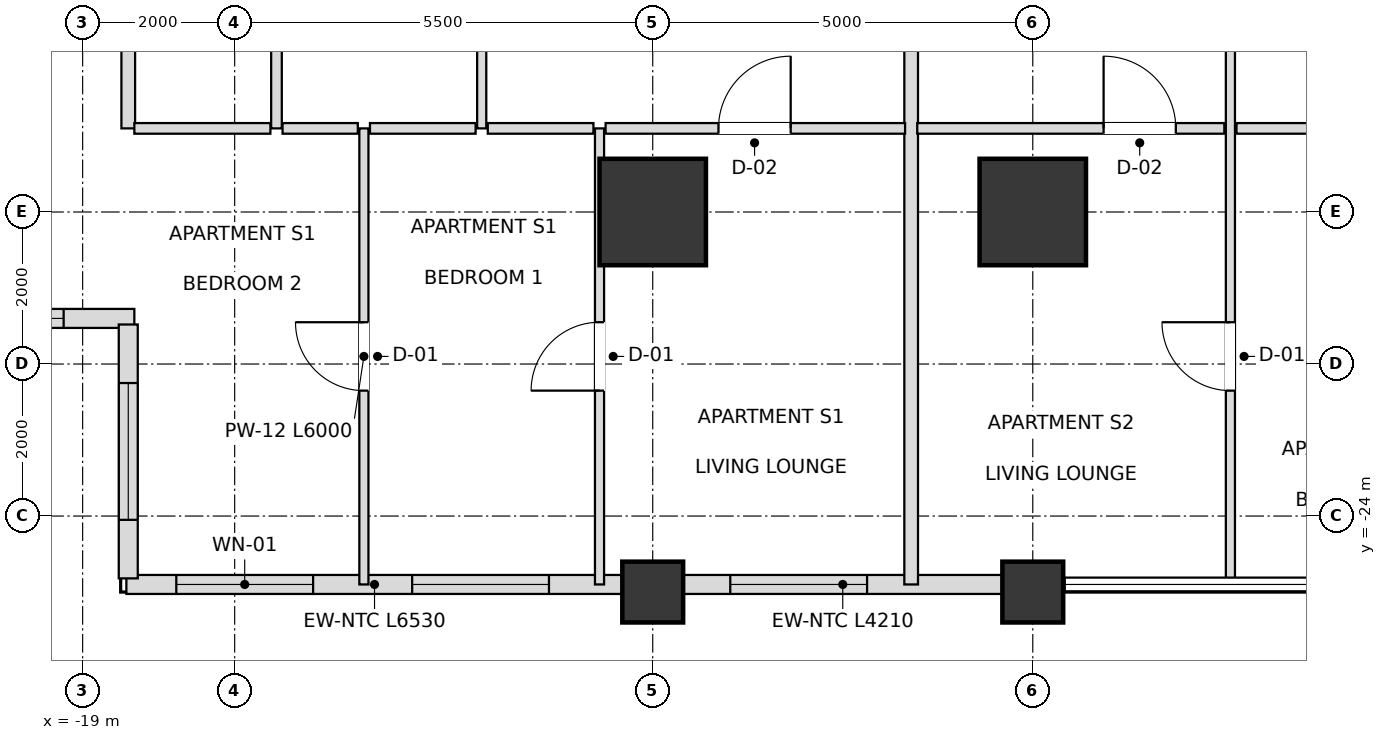
"""IFC4 building model, lengths in metres.
Left out: names, types, materials, properties, quantities, classifications, styles, units other than length and angle.
Written with IfcOpenShell. Run it as: python <this file> out.ifc"""

import sys

from ifc_helpers import new_model, si_unit, direction, frame, frame_2d, origin, origin_2d, place, context, subcontext, project, spatial, rectangle, extrude, element, fill, save


model = new_model("IFC4")
c1 = context("Model", 3, precision=1e-05, world=origin(), true_north=direction((0.0, 1.0)))
c2 = subcontext(c1, "Body", "Model", "MODEL_VIEW")
j1 = project(units=[si_unit("LENGTHUNIT", "METRE"), si_unit("PLANEANGLEUNIT", "RADIAN")], contexts=[c1])
p1 = place(None, origin())
s1 = spatial("IfcSite", under=j1, at=p1, CompositionType="ELEMENT")
p2 = place(p1, origin())
s2 = spatial("IfcBuilding", under=s1, at=p2, CompositionType="ELEMENT")
p3 = place(p2, frame((0.0, 0.0, 32.4)))
s3 = spatial("IfcBuildingStorey", under=s2, at=p3, CompositionType="ELEMENT", Elevation=32.4)
for number, where, z_axis, x_axis in (
    (1, (-11.5, -20.0, 0.0), (0.0, 0.0, 1.0), (1.0, 0.0, 0.0)),
    (2, (-6.5, -20.0, 0.0), (0.0, 0.0, 1.0), (1.0, 0.0, 0.0)),
):
    element("IfcColumn", number, at=place(p3, frame(where, z_axis=z_axis, x_axis=x_axis)), inside=s3, PredefinedType="USERDEFINED", context=c2, shape_type="SweptSolid", body=[
        extrude(rectangle(XDim=1.4, YDim=1.4, at=origin_2d()), origin(), (0.0, 0.0, 1.0), 3.6),
    ])
for number, where, z_axis, x_axis in (
    (3, (-11.5, -25.0, 0.0), (0.0, 0.0, 1.0), (1.0, 0.0, 0.0)),
    (4, (-6.5, -25.0, 0.0), (0.0, 0.0, 1.0), (1.0, 0.0, 0.0)),
):
    element("IfcColumn", number, at=place(p3, frame(where, z_axis=z_axis, x_axis=x_axis)), inside=s3, PredefinedType="COLUMN", context=c2, shape_type="SweptSolid", body=[
        extrude(rectangle(XDim=0.8, YDim=0.8, at=origin_2d()), origin(), (0.0, 0.0, 1.0), 3.6),
    ])
p4 = place(p3, frame((-18.425, -24.9, 0.0), z_axis=(0.0, 0.0, 1.0), x_axis=(1.0, 0.0, 0.0)))
e5 = element("IfcWall", 5, at=p4, inside=s3, PredefinedType="SOLIDWALL", context=c2, shape_type="SweptSolid", body=[
    extrude(rectangle(XDim=6.53, YDim=0.25, at=frame_2d((3.265, 0.0))), origin(), (0.0, 0.0, 1.0), 2.736),
])
p5 = place(p4, frame((0.657, 0.0, 0.72)))
e6 = element("IfcOpeningElement", 6, at=p5, cuts=e5, PredefinedType="OPENING", context=c2, shape_type="SweptSolid", body=[
    extrude(rectangle(XDim=1.8, YDim=1.68, at=frame_2d((0.9, 0.84))), frame((0.0, 0.135, 0.0), z_axis=(0.0, -1.0, 0.0), x_axis=(1.0, 0.0, 0.0)), (0.0, 0.0, 1.0), 0.27),
])
p6 = place(p4, frame((3.76, 0.0, 0.72)))
e7 = element("IfcOpeningElement", 7, at=p6, cuts=e5, PredefinedType="OPENING", context=c2, shape_type="SweptSolid", body=[
    extrude(rectangle(XDim=1.8, YDim=1.68, at=frame_2d((0.9, 0.84))), frame((0.0, 0.135, 0.0), z_axis=(0.0, -1.0, 0.0), x_axis=(1.0, 0.0, 0.0)), (0.0, 0.0, 1.0), 0.27),
])
p7 = place(p3, frame((-11.105, -24.9, 0.0), z_axis=(0.0, 0.0, 1.0), x_axis=(1.0, 0.0, 0.0)))
e8 = element("IfcWall", 8, at=p7, inside=s3, PredefinedType="SOLIDWALL", context=c2, shape_type="SweptSolid", body=[
    extrude(rectangle(XDim=4.21, YDim=0.25, at=frame_2d((2.105, 0.0))), origin(), (0.0, 0.0, 1.0), 2.736),
])
p8 = place(p7, frame((0.625, 0.0, 0.72)))
e9 = element("IfcOpeningElement", 9, at=p8, cuts=e8, PredefinedType="OPENING", context=c2, shape_type="SweptSolid", body=[
    extrude(rectangle(XDim=1.8, YDim=1.68, at=frame_2d((0.9, 0.84))), frame((0.0, 0.135, 0.0), z_axis=(0.0, -1.0, 0.0), x_axis=(1.0, 0.0, 0.0)), (0.0, 0.0, 1.0), 0.27),
])
p9 = place(p3, frame((-21.98, -21.4, 0.0), z_axis=(0.0, 0.0, 1.0), x_axis=(1.0, 0.0, 0.0)))
e10 = element("IfcWall", 10, at=p9, inside=s3, PredefinedType="SOLIDWALL", context=c2, shape_type="SweptSolid", body=[
    extrude(rectangle(XDim=3.66, YDim=0.25, at=frame_2d((1.83, 0.0))), origin(), (0.0, 0.0, 1.0), 2.736),
])
p10 = place(p9, frame((0.93, 0.0, 0.72)))
e11 = element("IfcOpeningElement", 11, at=p10, cuts=e10, PredefinedType="OPENING", context=c2, shape_type="SweptSolid", body=[
    extrude(rectangle(XDim=1.8, YDim=1.68, at=frame_2d((0.9, 0.84))), frame((0.0, 0.135, 0.0), z_axis=(0.0, -1.0, 0.0), x_axis=(1.0, 0.0, 0.0)), (0.0, 0.0, 1.0), 0.27),
])
p11 = place(p3, frame((-18.4, -21.48, 0.0), z_axis=(0.0, 0.0, 1.0), x_axis=(0.0, -1.0, 0.0)))
e12 = element("IfcWall", 12, at=p11, inside=s3, PredefinedType="SOLIDWALL", context=c2, shape_type="SweptSolid", body=[
    extrude(rectangle(XDim=3.34, YDim=0.25, at=frame_2d((1.67, 0.0))), origin(), (0.0, 0.0, 1.0), 2.736),
])
p12 = place(p11, frame((0.77, 0.0, 0.72)))
e13 = element("IfcOpeningElement", 13, at=p12, cuts=e12, PredefinedType="OPENING", context=c2, shape_type="SweptSolid", body=[
    extrude(rectangle(XDim=1.8, YDim=1.68, at=frame_2d((0.9, 0.84))), frame((0.0, 0.135, 0.0), z_axis=(0.0, -1.0, 0.0), x_axis=(1.0, 0.0, 0.0)), (0.0, 0.0, 1.0), 0.27),
])
p13 = place(p3, frame((-18.4, -18.9, 0.0), z_axis=(0.0, 0.0, 1.0), x_axis=(0.0, 1.0, 0.0)))
e14 = element("IfcWall", 14, at=p13, inside=s3, PredefinedType="PARTITIONING", context=c2, shape_type="SweptSolid", body=[
    extrude(rectangle(XDim=9.6, YDim=0.18, at=frame_2d((4.8, 0.0))), origin(), (0.0, 0.0, 1.0), 2.736),
])
p14 = place(p3, frame((-16.45, -18.9, 0.0), z_axis=(0.0, 0.0, 1.0), x_axis=(0.0, 1.0, 0.0)))
e15 = element("IfcWall", 15, at=p14, inside=s3, PredefinedType="PARTITIONING", context=c2, shape_type="SweptSolid", body=[
    extrude(rectangle(XDim=9.6, YDim=0.14, at=frame_2d((4.8, 0.0))), origin(), (0.0, 0.0, 1.0), 2.736),
])
p15 = place(p14, frame((4.222, 0.0, 0.0)))
e16 = element("IfcOpeningElement", 16, at=p15, cuts=e15, PredefinedType="OPENING", context=c2, shape_type="SweptSolid", body=[
    extrude(rectangle(XDim=0.9, YDim=2.1, at=frame_2d((0.45, 1.05))), frame((0.0, 0.08, 0.0), z_axis=(0.0, -1.0, 0.0), x_axis=(1.0, 0.0, 0.0)), (0.0, 0.0, 1.0), 0.16),
])
p16 = place(p3, frame((-15.3, -24.9, 0.0), z_axis=(0.0, 0.0, 1.0), x_axis=(0.0, 1.0, 0.0)))
e17 = element("IfcWall", 17, at=p16, inside=s3, PredefinedType="PARTITIONING", context=c2, shape_type="SweptSolid", body=[
    extrude(rectangle(XDim=6.0, YDim=0.12, at=frame_2d((3.0, 0.0))), origin(), (0.0, 0.0, 1.0), 2.736),
])
p17 = place(p16, frame((2.55, 0.0, 0.0)))
e18 = element("IfcOpeningElement", 18, at=p17, cuts=e17, PredefinedType="OPENING", context=c2, shape_type="SweptSolid", body=[
    extrude(rectangle(XDim=0.9, YDim=2.1, at=frame_2d((0.45, 1.05))), frame((0.0, 0.07, 0.0), z_axis=(0.0, -1.0, 0.0), x_axis=(1.0, 0.0, 0.0)), (0.0, 0.0, 1.0), 0.14),
])
p18 = place(p3, frame((-13.75, -18.9, 0.0), z_axis=(0.0, 0.0, 1.0), x_axis=(0.0, 1.0, 0.0)))
e19 = element("IfcWall", 19, at=p18, inside=s3, PredefinedType="PARTITIONING", context=c2, shape_type="SweptSolid", body=[
    extrude(rectangle(XDim=9.6, YDim=0.12, at=frame_2d((4.8, 0.0))), origin(), (0.0, 0.0, 1.0), 2.736),
])
p19 = place(p18, frame((4.325, 0.0, 0.0)))
e20 = element("IfcOpeningElement", 20, at=p19, cuts=e19, PredefinedType="OPENING", context=c2, shape_type="SweptSolid", body=[
    extrude(rectangle(XDim=0.95, YDim=2.1, at=frame_2d((0.475, 1.05))), frame((0.0, 0.07, 0.0), z_axis=(0.0, -1.0, 0.0), x_axis=(1.0, 0.0, 0.0)), (0.0, 0.0, 1.0), 0.14),
])
p20 = place(p3, frame((-12.2, -24.9, 0.0), z_axis=(0.0, 0.0, 1.0), x_axis=(0.0, 1.0, 0.0)))
e21 = element("IfcWall", 21, at=p20, inside=s3, PredefinedType="PARTITIONING", context=c2, shape_type="SweptSolid", body=[
    extrude(rectangle(XDim=6.0, YDim=0.12, at=frame_2d((3.0, 0.0))), origin(), (0.0, 0.0, 1.0), 2.736),
])
p21 = place(p20, frame((2.55, 0.0, 0.0)))
e22 = element("IfcOpeningElement", 22, at=p21, cuts=e21, PredefinedType="OPENING", context=c2, shape_type="SweptSolid", body=[
    extrude(rectangle(XDim=0.9, YDim=2.1, at=frame_2d((0.45, 1.05))), frame((0.0, 0.07, 0.0), z_axis=(0.0, -1.0, 0.0), x_axis=(1.0, 0.0, 0.0)), (0.0, 0.0, 1.0), 0.14),
])
p22 = place(p3, frame((-8.1, -24.9, 0.0), z_axis=(0.0, 0.0, 1.0), x_axis=(0.0, 1.0, 0.0)))
e23 = element("IfcWall", 23, at=p22, inside=s3, PredefinedType="PARTITIONING", context=c2, shape_type="SweptSolid", body=[
    extrude(rectangle(XDim=15.6, YDim=0.18, at=frame_2d((7.8, 0.0))), origin(), (0.0, 0.0, 1.0), 2.816),
])
p23 = place(p3, frame((-3.9, -24.9, 0.0), z_axis=(0.0, 0.0, 1.0), x_axis=(0.0, 1.0, 0.0)))
e24 = element("IfcWall", 24, at=p23, inside=s3, PredefinedType="PARTITIONING", context=c2, shape_type="SweptSolid", body=[
    extrude(rectangle(XDim=15.6, YDim=0.12, at=frame_2d((7.8, 0.0))), origin(), (0.0, 0.0, 1.0), 2.816),
])
p24 = place(p23, frame((10.325, 0.0, 0.0)))
e25 = element("IfcOpeningElement", 25, at=p24, cuts=e24, PredefinedType="OPENING", context=c2, shape_type="SweptSolid", body=[
    extrude(rectangle(XDim=0.95, YDim=2.1, at=frame_2d((0.475, 1.05))), frame((0.0, 0.07, 0.0), z_axis=(0.0, -1.0, 0.0), x_axis=(1.0, 0.0, 0.0)), (0.0, 0.0, 1.0), 0.14),
])
p25 = place(p23, frame((2.55, 0.0, 0.0)))
e26 = element("IfcOpeningElement", 26, at=p25, cuts=e24, PredefinedType="OPENING", context=c2, shape_type="SweptSolid", body=[
    extrude(rectangle(XDim=0.9, YDim=2.1, at=frame_2d((0.45, 1.05))), frame((0.0, 0.07, 0.0), z_axis=(0.0, -1.0, 0.0), x_axis=(1.0, 0.0, 0.0)), (0.0, 0.0, 1.0), 0.14),
])
p26 = place(p3, frame((-18.32, -18.9, 0.0), z_axis=(0.0, 0.0, 1.0), x_axis=(1.0, 0.0, 0.0)))
e27 = element("IfcWall", 27, at=p26, inside=s3, PredefinedType="PARTITIONING", context=c2, shape_type="SweptSolid", body=[
    extrude(rectangle(XDim=1.79, YDim=0.14, at=frame_2d((0.895, 0.0))), origin(), (0.0, 0.0, 1.0), 2.736),
])
p27 = place(p3, frame((-16.37, -18.9, 0.0), z_axis=(0.0, 0.0, 1.0), x_axis=(1.0, 0.0, 0.0)))
e28 = element("IfcWall", 28, at=p27, inside=s3, PredefinedType="PARTITIONING", context=c2, shape_type="SweptSolid", body=[
    extrude(rectangle(XDim=0.99, YDim=0.14, at=frame_2d((0.495, 0.0))), origin(), (0.0, 0.0, 1.0), 2.736),
])
for number, where, z_axis, x_axis in (
    (29, (-15.22, -18.9, 0.0), (0.0, 0.0, 1.0), (1.0, 0.0, 0.0)),
    (30, (-13.67, -18.9, 0.0), (0.0, 0.0, 1.0), (1.0, 0.0, 0.0)),
):
    element("IfcWall", number, at=place(p3, frame(where, z_axis=z_axis, x_axis=x_axis)), inside=s3, PredefinedType="PARTITIONING", context=c2, shape_type="SweptSolid", body=[
        extrude(rectangle(XDim=1.39, YDim=0.14, at=frame_2d((0.695, 0.0))), origin(), (0.0, 0.0, 1.0), 2.736),
    ])
p28 = place(p3, frame((-12.12, -18.9, 0.0), z_axis=(0.0, 0.0, 1.0), x_axis=(1.0, 0.0, 0.0)))
e31 = element("IfcWall", 31, at=p28, inside=s3, PredefinedType="PARTITIONING", context=c2, shape_type="SweptSolid", body=[
    extrude(rectangle(XDim=3.94, YDim=0.14, at=frame_2d((1.97, 0.0))), origin(), (0.0, 0.0, 1.0), 2.736),
])
p29 = place(p28, frame((1.485, 0.0, 0.0)))
e32 = element("IfcOpeningElement", 32, at=p29, cuts=e31, PredefinedType="OPENING", context=c2, shape_type="SweptSolid", body=[
    extrude(rectangle(XDim=0.95, YDim=2.1, at=frame_2d((0.475, 1.05))), frame((0.0, 0.08, 0.0), z_axis=(0.0, -1.0, 0.0), x_axis=(1.0, 0.0, 0.0)), (0.0, 0.0, 1.0), 0.16),
])
p30 = place(p3, frame((-8.02, -18.9, 0.0), z_axis=(0.0, 0.0, 1.0), x_axis=(1.0, 0.0, 0.0)))
e33 = element("IfcWall", 33, at=p30, inside=s3, PredefinedType="PARTITIONING", context=c2, shape_type="SweptSolid", body=[
    extrude(rectangle(XDim=4.04, YDim=0.14, at=frame_2d((2.02, 0.0))), origin(), (0.0, 0.0, 1.0), 2.816),
])
p31 = place(p30, frame((2.452, 0.0, 0.0)))
e34 = element("IfcOpeningElement", 34, at=p31, cuts=e33, PredefinedType="OPENING", context=c2, shape_type="SweptSolid", body=[
    extrude(rectangle(XDim=0.95, YDim=2.1, at=frame_2d((0.475, 1.05))), frame((0.0, 0.08, 0.0), z_axis=(0.0, -1.0, 0.0), x_axis=(1.0, 0.0, 0.0)), (0.0, 0.0, 1.0), 0.16),
])
p32 = place(p3, frame((-3.82, -18.9, 0.0), z_axis=(0.0, 0.0, 1.0), x_axis=(1.0, 0.0, 0.0)))
e35 = element("IfcWall", 35, at=p32, inside=s3, PredefinedType="PARTITIONING", context=c2, shape_type="SweptSolid", body=[
    extrude(rectangle(XDim=3.04, YDim=0.14, at=frame_2d((1.52, 0.0))), origin(), (0.0, 0.0, 1.0), 3.38),
])
p33 = place(p5, origin())
e36 = element("IfcWindow", 36, at=p33, inside=s3, PartitioningType="SINGLE_PANEL", PredefinedType="WINDOW", context=c2, shape_type="SweptSolid", body=[
    extrude(rectangle(XDim=1.8, YDim=1.68, at=frame_2d((0.9, 0.84))), frame((0.0, 0.03, 0.0), z_axis=(0.0, -1.0, 0.0), x_axis=(1.0, 0.0, 0.0)), (0.0, 0.0, 1.0), 0.06),
])
fill(e6, e36)
p34 = place(p6, origin())
e37 = element("IfcWindow", 37, at=p34, inside=s3, PartitioningType="SINGLE_PANEL", PredefinedType="WINDOW", context=c2, shape_type="SweptSolid", body=[
    extrude(rectangle(XDim=1.8, YDim=1.68, at=frame_2d((0.9, 0.84))), frame((0.0, 0.03, 0.0), z_axis=(0.0, -1.0, 0.0), x_axis=(1.0, 0.0, 0.0)), (0.0, 0.0, 1.0), 0.06),
])
fill(e7, e37)
p35 = place(p8, origin())
e38 = element("IfcWindow", 38, at=p35, inside=s3, PartitioningType="SINGLE_PANEL", PredefinedType="WINDOW", context=c2, shape_type="SweptSolid", body=[
    extrude(rectangle(XDim=1.8, YDim=1.68, at=frame_2d((0.9, 0.84))), frame((0.0, 0.03, 0.0), z_axis=(0.0, -1.0, 0.0), x_axis=(1.0, 0.0, 0.0)), (0.0, 0.0, 1.0), 0.06),
])
fill(e9, e38)
p36 = place(p10, origin())
e39 = element("IfcWindow", 39, at=p36, inside=s3, PartitioningType="SINGLE_PANEL", PredefinedType="WINDOW", context=c2, shape_type="SweptSolid", body=[
    extrude(rectangle(XDim=1.8, YDim=1.68, at=frame_2d((0.9, 0.84))), frame((0.0, 0.03, 0.0), z_axis=(0.0, -1.0, 0.0), x_axis=(1.0, 0.0, 0.0)), (0.0, 0.0, 1.0), 0.06),
])
fill(e11, e39)
p37 = place(p12, origin())
e40 = element("IfcWindow", 40, at=p37, inside=s3, PartitioningType="SINGLE_PANEL", PredefinedType="WINDOW", context=c2, shape_type="SweptSolid", body=[
    extrude(rectangle(XDim=1.8, YDim=1.68, at=frame_2d((0.9, 0.84))), frame((0.0, 0.03, 0.0), z_axis=(0.0, -1.0, 0.0), x_axis=(1.0, 0.0, 0.0)), (0.0, 0.0, 1.0), 0.06),
])
fill(e13, e40)
p38 = place(p29, origin())
e41 = element("IfcDoor", 41, at=p38, inside=s3, OperationType="SINGLE_SWING_RIGHT", PredefinedType="DOOR", context=c2, shape_type="SweptSolid", body=[
    extrude(rectangle(XDim=0.95, YDim=2.1, at=frame_2d((0.475, 1.05))), frame((0.0, 0.025, 0.0), z_axis=(0.0, -1.0, 0.0), x_axis=(1.0, 0.0, 0.0)), (0.0, 0.0, 1.0), 0.05),
])
fill(e32, e41)
p39 = place(p21, origin())
e42 = element("IfcDoor", 42, at=p39, inside=s3, OperationType="SINGLE_SWING_LEFT", PredefinedType="DOOR", context=c2, shape_type="SweptSolid", body=[
    extrude(rectangle(XDim=0.9, YDim=2.1, at=frame_2d((0.45, 1.05))), frame((0.0, 0.025, 0.0), z_axis=(0.0, -1.0, 0.0), x_axis=(1.0, 0.0, 0.0)), (0.0, 0.0, 1.0), 0.05),
])
fill(e22, e42)
p40 = place(p17, origin())
e43 = element("IfcDoor", 43, at=p40, inside=s3, OperationType="SINGLE_SWING_RIGHT", PredefinedType="DOOR", context=c2, shape_type="SweptSolid", body=[
    extrude(rectangle(XDim=0.9, YDim=2.1, at=frame_2d((0.45, 1.05))), frame((0.0, 0.025, 0.0), z_axis=(0.0, -1.0, 0.0), x_axis=(1.0, 0.0, 0.0)), (0.0, 0.0, 1.0), 0.05),
])
fill(e18, e43)
p41 = place(p31, origin())
e44 = element("IfcDoor", 44, at=p41, inside=s3, OperationType="SINGLE_SWING_LEFT", PredefinedType="DOOR", context=c2, shape_type="SweptSolid", body=[
    extrude(rectangle(XDim=0.95, YDim=2.1, at=frame_2d((0.475, 1.05))), frame((0.0, 0.025, 0.0), z_axis=(0.0, -1.0, 0.0), x_axis=(1.0, 0.0, 0.0)), (0.0, 0.0, 1.0), 0.05),
])
fill(e34, e44)
p42 = place(p25, origin())
e45 = element("IfcDoor", 45, at=p42, inside=s3, OperationType="SINGLE_SWING_RIGHT", PredefinedType="DOOR", context=c2, shape_type="SweptSolid", body=[
    extrude(rectangle(XDim=0.9, YDim=2.1, at=frame_2d((0.45, 1.05))), frame((0.0, 0.025, 0.0), z_axis=(0.0, -1.0, 0.0), x_axis=(1.0, 0.0, 0.0)), (0.0, 0.0, 1.0), 0.05),
])
fill(e26, e45)
save(model, sys.argv[1])
